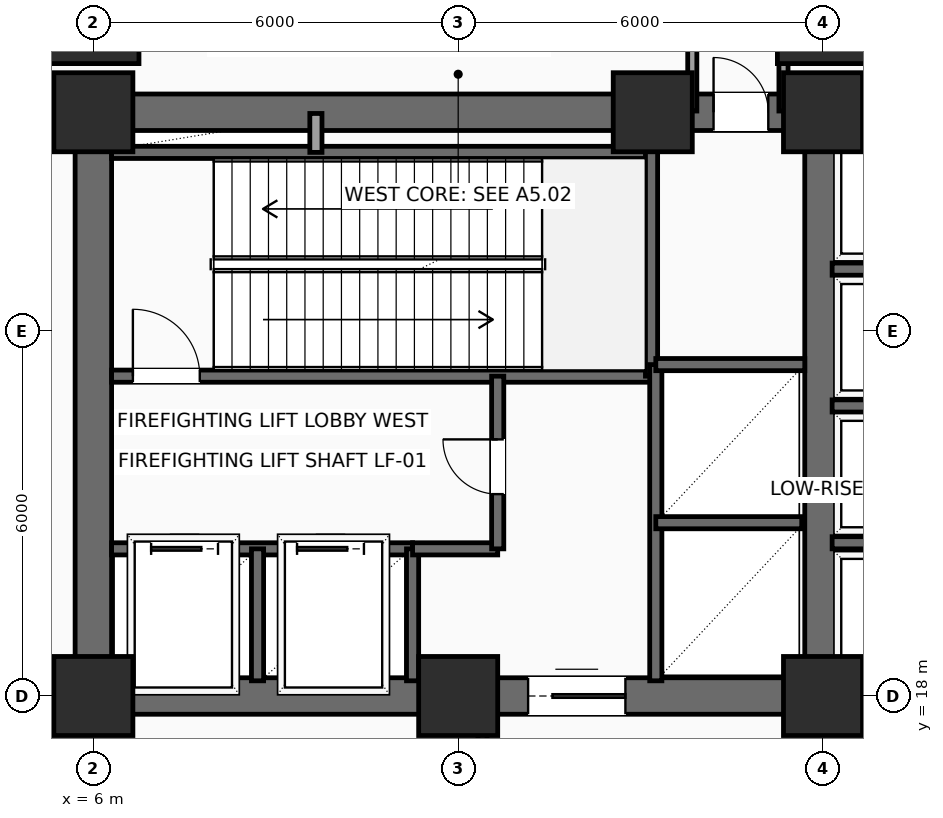
"""IFC4 building model, lengths in metres.
Left out: names, types, materials, properties, quantities, classifications, styles, units other than length and angle.
Written with IfcOpenShell. Run it as: python <this file> out.ifc"""

import sys

from ifc_helpers import new_model, si_unit, direction, frame, frame_2d, origin, origin_2d, place, context, subcontext, project, spatial, rectangle, extrude, element, fill, save


model = new_model("IFC4")
c1 = context("Model", 3, precision=1e-05, world=origin(), true_north=direction((0.0, 1.0)))
c2 = subcontext(c1, "Body", "Model", "MODEL_VIEW")
j1 = project(units=[si_unit("LENGTHUNIT", "METRE"), si_unit("PLANEANGLEUNIT", "RADIAN")], contexts=[c1])
p1 = place(None, origin())
s1 = spatial("IfcSite", under=j1, at=p1, CompositionType="ELEMENT")
p2 = place(p1, origin())
s2 = spatial("IfcBuilding", under=s1, at=p2, CompositionType="ELEMENT")
p3 = place(p2, frame((0.0, 0.0, 21.9)))
s3 = spatial("IfcBuildingStorey", under=s2, at=p3, CompositionType="ELEMENT", Elevation=21.9)
for number, where, z_axis, x_axis in (
    (1, (6.0, 18.0, 0.0), (0.0, 0.0, 1.0), (1.0, 0.0, 0.0)),
    (2, (12.0, 18.0, 0.0), (0.0, 0.0, 1.0), (1.0, 0.0, 0.0)),
    (3, (18.0, 18.0, 0.0), (0.0, 0.0, 1.0), (1.0, 0.0, 0.0)),
    (4, (6.0, 27.6, 0.0), (0.0, 0.0, 1.0), (1.0, 0.0, 0.0)),
    (5, (15.2, 27.6, 0.0), (0.0, 0.0, 1.0), (1.0, 0.0, 0.0)),
    (6, (18.0, 27.6, 0.0), (0.0, 0.0, 1.0), (1.0, 0.0, 0.0)),
):
    element("IfcColumn", number, at=place(p3, frame(where, z_axis=z_axis, x_axis=x_axis)), inside=s3, PredefinedType="COLUMN", context=c2, shape_type="SweptSolid", body=[
        extrude(rectangle(XDim=1.3, YDim=1.3, at=origin_2d()), origin(), (0.0, 0.0, 1.0), 5.7),
    ])
for number, where, z_axis, x_axis in (
    (7, (6.0, 29.15, 0.0), (0.0, 0.0, 1.0), (1.0, 0.0, 0.0)),
    (8, (18.0, 29.15, 0.0), (0.0, 0.0, 1.0), (1.0, 0.0, 0.0)),
):
    element("IfcColumn", number, at=place(p3, frame(where, z_axis=z_axis, x_axis=x_axis)), inside=s3, PredefinedType="COLUMN", context=c2, shape_type="SweptSolid", body=[
        extrude(rectangle(XDim=1.5, YDim=1.5, at=origin_2d()), origin(), (0.0, 0.0, 1.0), 5.35),
    ])
p4 = place(p3, frame((6.0, 18.0, 0.0), z_axis=(0.0, 0.0, 1.0), x_axis=(1.0, 0.0, 0.0)))
e9 = element("IfcWall", 9, at=p4, inside=s3, PredefinedType="SHEAR", context=c2, shape_type="SweptSolid", body=[
    extrude(rectangle(XDim=12.0, YDim=0.6, at=frame_2d((6.0, 0.0))), origin(), (0.0, 0.0, 1.0), 5.35),
])
p5 = place(p4, frame((7.15, 0.0, 0.0)))
e10 = element("IfcOpeningElement", 10, at=p5, cuts=e9, PredefinedType="OPENING", context=c2, shape_type="SweptSolid", body=[
    extrude(rectangle(XDim=1.6, YDim=2.3, at=frame_2d((0.8, 1.15))), frame((0.0, 0.31, 0.0), z_axis=(0.0, -1.0, 0.0), x_axis=(1.0, 0.0, 0.0)), (0.0, 0.0, 1.0), 0.62),
])
p6 = place(p3, frame((6.0, 27.6, 0.0), z_axis=(0.0, 0.0, 1.0), x_axis=(1.0, 0.0, 0.0)))
e11 = element("IfcWall", 11, at=p6, inside=s3, PredefinedType="SHEAR", context=c2, shape_type="SweptSolid", body=[
    extrude(rectangle(XDim=12.0, YDim=0.6, at=frame_2d((6.0, 0.0))), origin(), (0.0, 0.0, 1.0), 5.35),
])
p7 = place(p6, frame((10.2, 0.0, 0.0)))
e12 = element("IfcOpeningElement", 12, at=p7, cuts=e11, PredefinedType="OPENING", context=c2, shape_type="SweptSolid", body=[
    extrude(rectangle(XDim=0.9, YDim=2.15, at=frame_2d((0.45, 1.075))), frame((0.0, 0.31, 0.0), z_axis=(0.0, -1.0, 0.0), x_axis=(1.0, 0.0, 0.0)), (0.0, 0.0, 1.0), 0.62),
])
for number, where, z_axis, x_axis in (
    (13, (6.0, 18.0, 0.0), (0.0, 0.0, 1.0), (0.0, 1.0, 0.0)),
    (14, (18.0, 18.0, 0.0), (0.0, 0.0, 1.0), (0.0, 1.0, 0.0)),
):
    element("IfcWall", number, at=place(p3, frame(where, z_axis=z_axis, x_axis=x_axis)), inside=s3, PredefinedType="SHEAR", context=c2, shape_type="SweptSolid", body=[
        extrude(rectangle(XDim=9.6, YDim=0.6, at=frame_2d((4.8, 0.0))), origin(), (0.0, 0.0, 1.0), 5.35),
    ])
p8 = place(p3, frame((6.3, 23.26, 0.0), z_axis=(0.0, 0.0, 1.0), x_axis=(1.0, 0.0, 0.0)))
e15 = element("IfcWall", 15, at=p8, inside=s3, PredefinedType="SHEAR", context=c2, shape_type="SweptSolid", body=[
    extrude(rectangle(XDim=8.88, YDim=0.2, at=frame_2d((4.44, 0.0))), origin(), (0.0, 0.0, 1.0), 5.35),
])
p9 = place(p8, frame((0.35, 0.0, 0.0)))
e16 = element("IfcOpeningElement", 16, at=p9, cuts=e15, PredefinedType="OPENING", context=c2, shape_type="SweptSolid", body=[
    extrude(rectangle(XDim=1.1, YDim=2.2, at=frame_2d((0.55, 1.1))), frame((0.0, 0.11, 0.0), z_axis=(0.0, -1.0, 0.0), x_axis=(1.0, 0.0, 0.0)), (0.0, 0.0, 1.0), 0.22),
])
p10 = place(p3, frame((6.3, 26.94, 0.0), z_axis=(0.0, 0.0, 1.0), x_axis=(1.0, 0.0, 0.0)))
e17 = element("IfcWall", 17, at=p10, inside=s3, PredefinedType="SHEAR", context=c2, shape_type="SweptSolid", body=[
    extrude(rectangle(XDim=8.88, YDim=0.2, at=frame_2d((4.44, 0.0))), origin(), (0.0, 0.0, 1.0), 5.35),
])
p11 = place(p3, frame((15.18, 23.26, 0.0), z_axis=(0.0, 0.0, 1.0), x_axis=(0.0, 1.0, 0.0)))
e18 = element("IfcWall", 18, at=p11, inside=s3, PredefinedType="SHEAR", context=c2, shape_type="SweptSolid", body=[
    extrude(rectangle(XDim=4.04, YDim=0.2, at=frame_2d((2.02, 0.0))), origin(), (0.0, 0.0, 1.0), 5.35),
])
p12 = place(p3, frame((6.3, 20.42, 0.0), z_axis=(0.0, 0.0, 1.0), x_axis=(1.0, 0.0, 0.0)))
e19 = element("IfcWall", 19, at=p12, inside=s3, PredefinedType="SHEAR", context=c2, shape_type="SweptSolid", body=[
    extrude(rectangle(XDim=4.95, YDim=0.2, at=frame_2d((2.475, 0.0))), origin(), (0.0, 0.0, 1.0), 5.35),
])
p13 = place(p12, frame((0.65, 0.0, 0.0)))
e20 = element("IfcOpeningElement", 20, at=p13, cuts=e19, PredefinedType="OPENING", context=c2, shape_type="SweptSolid", body=[
    extrude(rectangle(XDim=1.1, YDim=2.2, at=frame_2d((0.55, 1.1))), frame((0.0, 0.11, 0.0), z_axis=(0.0, -1.0, 0.0), x_axis=(1.0, 0.0, 0.0)), (0.0, 0.0, 1.0), 0.22),
])
p14 = place(p12, frame((3.05, 0.0, 0.0)))
e21 = element("IfcOpeningElement", 21, at=p14, cuts=e19, PredefinedType="OPENING", context=c2, shape_type="SweptSolid", body=[
    extrude(rectangle(XDim=1.1, YDim=2.2, at=frame_2d((0.55, 1.1))), frame((0.0, 0.11, 0.0), z_axis=(0.0, -1.0, 0.0), x_axis=(1.0, 0.0, 0.0)), (0.0, 0.0, 1.0), 0.22),
])
for number, where, z_axis, x_axis in (
    (22, (8.7, 18.25, 0.0), (0.0, 0.0, 1.0), (0.0, 1.0, 0.0)),
    (23, (11.25, 18.25, 0.0), (0.0, 0.0, 1.0), (0.0, 1.0, 0.0)),
):
    element("IfcWall", number, at=place(p3, frame(where, z_axis=z_axis, x_axis=x_axis)), inside=s3, PredefinedType="SHEAR", context=c2, shape_type="SweptSolid", body=[
        extrude(rectangle(XDim=2.17, YDim=0.2, at=frame_2d((1.085, 0.0))), origin(), (0.0, 0.0, 1.0), 5.35),
    ])
p15 = place(p3, frame((11.25, 20.42, 0.0), z_axis=(0.0, 0.0, 1.0), x_axis=(1.0, 0.0, 0.0)))
e24 = element("IfcWall", 24, at=p15, inside=s3, PredefinedType="SHEAR", context=c2, shape_type="SweptSolid", body=[
    extrude(rectangle(XDim=1.4, YDim=0.2, at=frame_2d((0.7, 0.0))), origin(), (0.0, 0.0, 1.0), 5.35),
])
p16 = place(p3, frame((12.65, 20.42, 0.0), z_axis=(0.0, 0.0, 1.0), x_axis=(0.0, 1.0, 0.0)))
e25 = element("IfcWall", 25, at=p16, inside=s3, PredefinedType="SHEAR", context=c2, shape_type="SweptSolid", body=[
    extrude(rectangle(XDim=2.84, YDim=0.2, at=frame_2d((1.42, 0.0))), origin(), (0.0, 0.0, 1.0), 5.35),
])
p17 = place(p16, frame((0.9, 0.0, 0.0)))
e26 = element("IfcOpeningElement", 26, at=p17, cuts=e25, PredefinedType="OPENING", context=c2, shape_type="SweptSolid", body=[
    extrude(rectangle(XDim=0.9, YDim=2.15, at=frame_2d((0.45, 1.075))), frame((0.0, 0.11, 0.0), z_axis=(0.0, -1.0, 0.0), x_axis=(1.0, 0.0, 0.0)), (0.0, 0.0, 1.0), 0.22),
])
p18 = place(p3, frame((9.66, 26.94, 0.0), z_axis=(0.0, 0.0, 1.0), x_axis=(0.0, 1.0, 0.0)))
e27 = element("IfcWall", 27, at=p18, inside=s3, PredefinedType="SOLIDWALL", context=c2, shape_type="SweptSolid", body=[
    extrude(rectangle(XDim=0.64, YDim=0.2, at=frame_2d((0.32, 0.0))), origin(), (0.0, 0.0, 1.0), 5.35),
])
p19 = place(p3, frame((15.25, 18.25, 0.0), z_axis=(0.0, 0.0, 1.0), x_axis=(0.0, 1.0, 0.0)))
e28 = element("IfcWall", 28, at=p19, inside=s3, PredefinedType="SHEAR", context=c2, shape_type="SweptSolid", body=[
    extrude(rectangle(XDim=5.2, YDim=0.2, at=frame_2d((2.6, 0.0))), origin(), (0.0, 0.0, 1.0), 5.35),
])
p20 = place(p3, frame((15.25, 20.85, 0.0), z_axis=(0.0, 0.0, 1.0), x_axis=(1.0, 0.0, 0.0)))
e29 = element("IfcWall", 29, at=p20, inside=s3, PredefinedType="SHEAR", context=c2, shape_type="SweptSolid", body=[
    extrude(rectangle(XDim=2.4, YDim=0.2, at=frame_2d((1.2, 0.0))), origin(), (0.0, 0.0, 1.0), 5.35),
])
p21 = place(p3, frame((15.25, 23.45, 0.0), z_axis=(0.0, 0.0, 1.0), x_axis=(1.0, 0.0, 0.0)))
e30 = element("IfcWall", 30, at=p21, inside=s3, PredefinedType="SHEAR", context=c2, shape_type="SweptSolid", body=[
    extrude(rectangle(XDim=2.45, YDim=0.2, at=frame_2d((1.225, 0.0))), origin(), (0.0, 0.0, 1.0), 5.35),
])
for number, where, z_axis, x_axis in (
    (31, (18.1, 27.3, 0.0), (0.0, 0.0, 1.0), (1.0, 0.0, 0.0)),
    (32, (18.1, 18.25, 0.0), (0.0, 0.0, 1.0), (1.0, 0.0, 0.0)),
):
    element("IfcWall", number, at=place(p3, frame(where, z_axis=z_axis, x_axis=x_axis)), inside=s3, PredefinedType="SHEAR", context=c2, shape_type="SweptSolid", body=[
        extrude(rectangle(XDim=2.35, YDim=0.2, at=frame_2d((1.175, 0.0))), origin(), (0.0, 0.0, 1.0), 5.35),
    ])
for number, where, z_axis, x_axis in (
    (33, (18.15, 20.52, 0.0), (0.0, 0.0, 1.0), (1.0, 0.0, 0.0)),
    (34, (18.15, 22.77, 0.0), (0.0, 0.0, 1.0), (1.0, 0.0, 0.0)),
    (35, (18.15, 25.02, 0.0), (0.0, 0.0, 1.0), (1.0, 0.0, 0.0)),
):
    element("IfcWall", number, at=place(p3, frame(where, z_axis=z_axis, x_axis=x_axis)), inside=s3, PredefinedType="SHEAR", context=c2, shape_type="SweptSolid", body=[
        extrude(rectangle(XDim=2.3, YDim=0.2, at=frame_2d((1.15, 0.0))), origin(), (0.0, 0.0, 1.0), 5.35),
    ])
p22 = place(p3, frame((12.4, 16.55, 0.0), z_axis=(0.0, 0.0, 1.0), x_axis=(0.0, 1.0, 0.0)))
e36 = element("IfcWall", 36, at=p22, inside=s3, PredefinedType="PARTITIONING", context=c2, shape_type="SweptSolid", body=[
    extrude(rectangle(XDim=1.41, YDim=0.15, at=frame_2d((0.705, 0.0))), origin(), (0.0, 0.0, 1.0), 5.35),
])
for number, where, z_axis, x_axis in (
    (37, (17.35, 30.2, 0.0), (0.0, 0.0, 1.0), (0.0, -1.0, 0.0)),
    (38, (15.85, 27.62, 0.0), (0.0, 0.0, 1.0), (0.0, 1.0, 0.0)),
):
    element("IfcWall", number, at=place(p3, frame(where, z_axis=z_axis, x_axis=x_axis)), inside=s3, PredefinedType="PARTITIONING", context=c2, shape_type="SweptSolid", body=[
        extrude(rectangle(XDim=2.58, YDim=0.15, at=frame_2d((1.29, 0.0))), origin(), (0.0, 0.0, 1.0), 5.35),
    ])
p23 = place(p5, origin())
e39 = element("IfcDoor", 39, at=p23, inside=s3, OperationType="DOUBLE_DOOR_SLIDING", PredefinedType="DOOR", context=c2, shape_type="SweptSolid", body=[
    extrude(rectangle(XDim=1.6, YDim=2.3, at=frame_2d((0.8, 1.15))), frame((0.0, 0.025, 0.0), z_axis=(0.0, -1.0, 0.0), x_axis=(1.0, 0.0, 0.0)), (0.0, 0.0, 1.0), 0.05),
])
fill(e10, e39)
p24 = place(p7, origin())
e40 = element("IfcDoor", 40, at=p24, inside=s3, OperationType="SINGLE_SWING_LEFT", PredefinedType="DOOR", context=c2, shape_type="SweptSolid", body=[
    extrude(rectangle(XDim=0.9, YDim=2.15, at=frame_2d((0.45, 1.075))), frame((0.0, 0.025, 0.0), z_axis=(0.0, -1.0, 0.0), x_axis=(1.0, 0.0, 0.0)), (0.0, 0.0, 1.0), 0.05),
])
fill(e12, e40)
p25 = place(p9, origin())
e41 = element("IfcDoor", 41, at=p25, inside=s3, OperationType="SINGLE_SWING_LEFT", PredefinedType="DOOR", context=c2, shape_type="SweptSolid", body=[
    extrude(rectangle(XDim=1.1, YDim=2.2, at=frame_2d((0.55, 1.1))), frame((0.0, 0.025, 0.0), z_axis=(0.0, -1.0, 0.0), x_axis=(1.0, 0.0, 0.0)), (0.0, 0.0, 1.0), 0.05),
])
fill(e16, e41)
p26 = place(p13, origin())
e42 = element("IfcDoor", 42, at=p26, inside=s3, OperationType="SLIDING_TO_LEFT", PredefinedType="DOOR", context=c2, shape_type="SweptSolid", body=[
    extrude(rectangle(XDim=1.1, YDim=2.2, at=frame_2d((0.55, 1.1))), frame((0.0, 0.025, 0.0), z_axis=(0.0, -1.0, 0.0), x_axis=(1.0, 0.0, 0.0)), (0.0, 0.0, 1.0), 0.05),
])
fill(e20, e42)
p27 = place(p14, origin())
e43 = element("IfcDoor", 43, at=p27, inside=s3, OperationType="SLIDING_TO_LEFT", PredefinedType="DOOR", context=c2, shape_type="SweptSolid", body=[
    extrude(rectangle(XDim=1.1, YDim=2.2, at=frame_2d((0.55, 1.1))), frame((0.0, 0.025, 0.0), z_axis=(0.0, -1.0, 0.0), x_axis=(1.0, 0.0, 0.0)), (0.0, 0.0, 1.0), 0.05),
])
fill(e21, e43)
p28 = place(p17, origin())
e44 = element("IfcDoor", 44, at=p28, inside=s3, OperationType="SINGLE_SWING_RIGHT", PredefinedType="DOOR", context=c2, shape_type="SweptSolid", body=[
    extrude(rectangle(XDim=0.9, YDim=2.15, at=frame_2d((0.45, 1.075))), frame((0.0, 0.025, 0.0), z_axis=(0.0, -1.0, 0.0), x_axis=(1.0, 0.0, 0.0)), (0.0, 0.0, 1.0), 0.05),
])
fill(e26, e44)
save(model, sys.argv[1])
